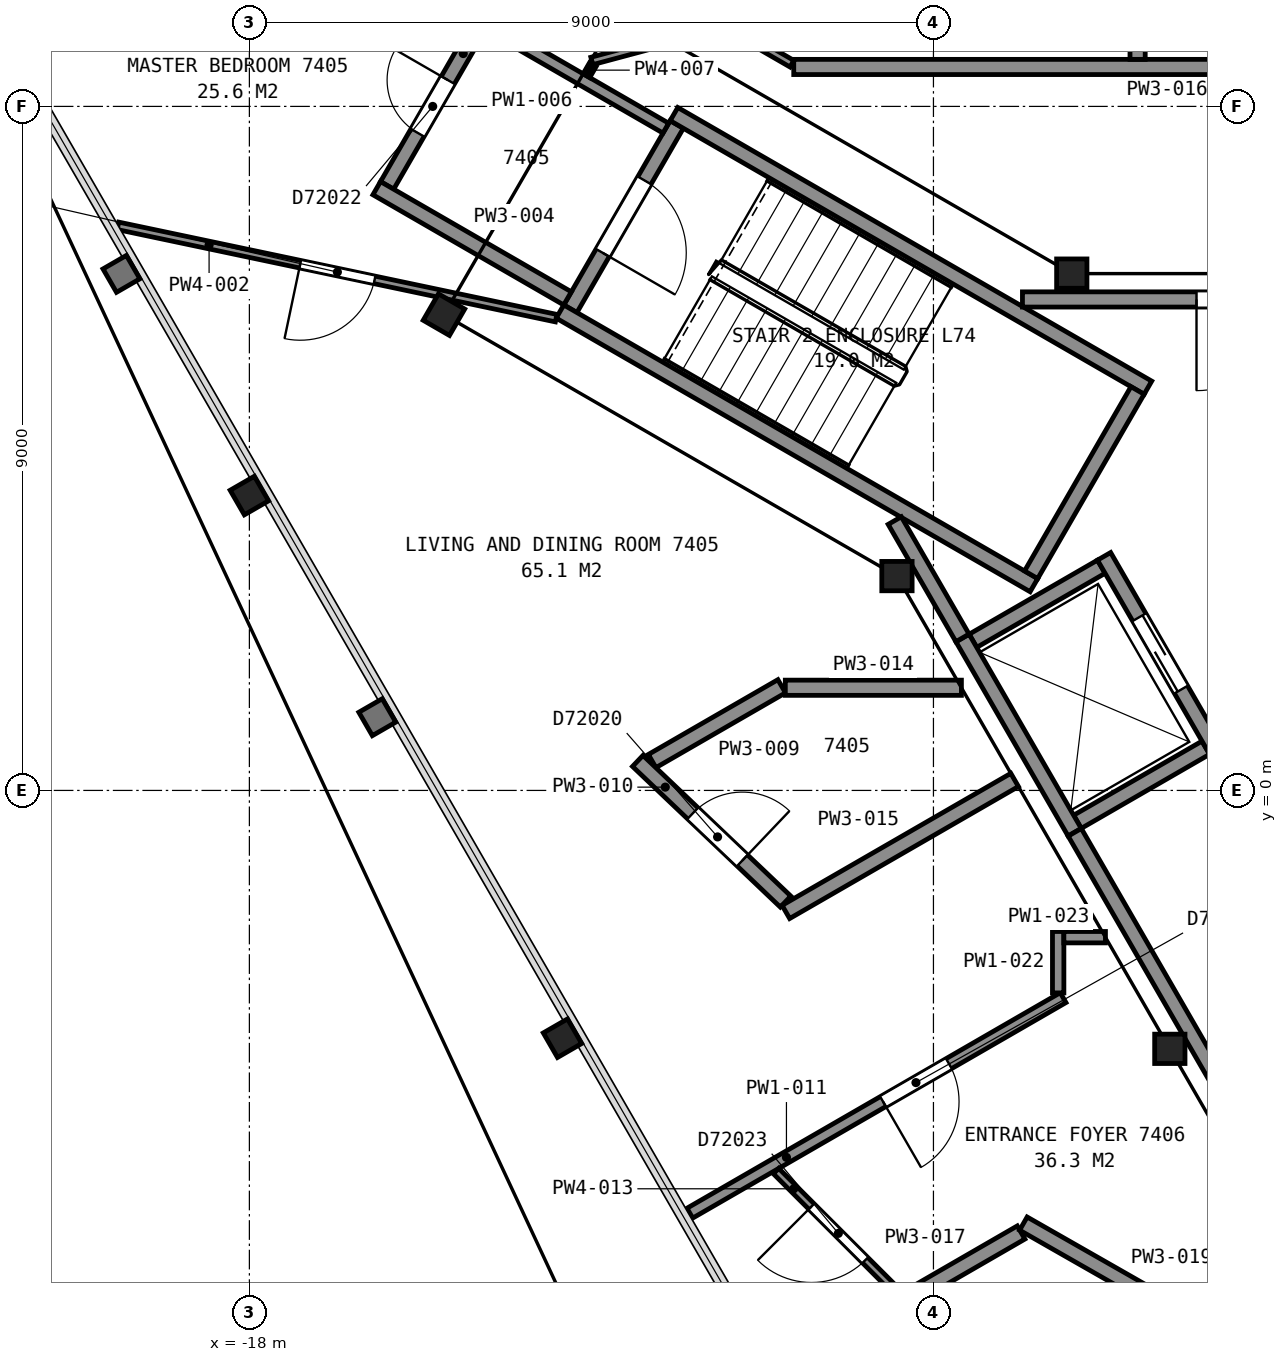
"""IFC4 building model, lengths in metres.
Left out: names, types, materials, properties, quantities, classifications, styles, units other than length and angle.
Written with IfcOpenShell. Run it as: python <this file> out.ifc"""

import sys

from ifc_helpers import new_model, si_unit, direction, frame, frame_2d, origin, origin_2d, place, context, subcontext, project, spatial, rectangle, i_section, extrude, element, fill, save


model = new_model("IFC4")
c1 = context("Model", 3, precision=1e-05, world=origin(), true_north=direction((0.0, 1.0)))
c2 = subcontext(c1, "Body", "Model", "MODEL_VIEW")
j1 = project(units=[si_unit("LENGTHUNIT", "METRE"), si_unit("PLANEANGLEUNIT", "RADIAN")], contexts=[c1])
p1 = place(None, origin())
s1 = spatial("IfcSite", under=j1, at=p1, CompositionType="ELEMENT")
p2 = place(p1, origin())
s2 = spatial("IfcBuilding", under=s1, at=p2, CompositionType="ELEMENT")
p3 = place(p2, frame((0.0, 0.0, 293.6)))
s3 = spatial("IfcBuildingStorey", under=s2, at=p3, CompositionType="ELEMENT", Elevation=293.6)
for number, where, z_axis, x_axis in (
    (1, (-18.0, 3.88, 0.0), (0.0, 0.0, 1.0), (-0.5, 0.866, 0.0)),
    (2, (-13.88, -3.26, 0.0), (0.0, 0.0, 1.0), (-0.5, 0.866, 0.0)),
):
    element("IfcColumn", number, at=place(p3, frame(where, z_axis=z_axis, x_axis=x_axis)), inside=s3, PredefinedType="COLUMN", context=c2, shape_type="SweptSolid", body=[
        extrude(i_section(OverallWidth=0.373, OverallDepth=0.368, WebThickness=0.015, FlangeThickness=0.024, FilletRadius=0.015, at=origin_2d()), origin(), (0.0, 0.0, 1.0), 3.7),
    ])
p4 = place(p3, frame((-7.18, 6.8, 0.0), z_axis=(0.0, 0.0, 1.0), x_axis=(1.0, 0.0, 0.0)))
e3 = element("IfcColumn", 3, at=p4, inside=s3, PredefinedType="COLUMN", context=c2, shape_type="SweptSolid", body=[
    extrude(i_section(OverallWidth=0.399, OverallDepth=0.386, WebThickness=0.021, FlangeThickness=0.033, FilletRadius=0.015, at=origin_2d()), origin(), (0.0, 0.0, 1.0), 3.7),
])
p5 = place(p3, frame((-15.44, 6.26, 0.0), z_axis=(0.0, 0.0, 1.0), x_axis=(0.5, 0.866025403784, 0.0)))
e4 = element("IfcColumn", 4, at=p5, inside=s3, PredefinedType="COLUMN", context=c2, shape_type="SweptSolid", body=[
    extrude(i_section(OverallWidth=0.401, OverallDepth=0.399, WebThickness=0.025, FlangeThickness=0.04, FilletRadius=0.015, at=origin_2d()), origin(), (0.0, 0.0, 1.0), 3.7),
])
for number, where, z_axis, x_axis in (
    (5, (-9.48, 2.82, 0.0), (0.0, 0.0, 1.0), (1.0, 0.0, 0.0)),
    (6, (-5.89, -3.4, 0.0), (0.0, 0.0, 1.0), (1.0, 0.0, 0.0)),
):
    element("IfcColumn", number, at=place(p3, frame(where, z_axis=z_axis, x_axis=x_axis)), inside=s3, PredefinedType="COLUMN", context=c2, shape_type="SweptSolid", body=[
        extrude(i_section(OverallWidth=0.399, OverallDepth=0.386, WebThickness=0.021, FlangeThickness=0.033, FilletRadius=0.015, at=origin_2d()), origin(), (0.0, 0.0, 1.0), 3.7),
    ])
p6 = place(p3, frame((-12.377, 8.762, 0.0), z_axis=(0.0, 0.0, 1.0), x_axis=(-0.500049511043, -0.865996816683, 0.0)))
e7 = element("IfcWall", 7, at=p6, inside=s3, PredefinedType="PARTITIONING", context=c2, shape_type="SweptSolid", body=[
    extrude(rectangle(XDim=2.8, YDim=0.2, at=frame_2d((1.4, 0.0))), origin(), (0.0, 0.0, 1.0), 3.45),
])
p7 = place(p6, frame((0.85, 0.0, 0.0)))
e8 = element("IfcOpeningElement", 8, at=p7, cuts=e7, PredefinedType="OPENING", context=c2, shape_type="SweptSolid", body=[
    extrude(rectangle(XDim=1.1, YDim=2.1, at=frame_2d((0.55, 1.05))), frame((0.0, 0.11, 0.0), z_axis=(0.0, -1.0, 0.0), x_axis=(1.0, 0.0, 0.0)), (0.0, 0.0, 1.0), 0.22),
])
for number, where, z_axis, x_axis in (
    (9, (-7.678, 2.701, 0.0), (0.0, 0.0, 1.0), (-0.866, 0.5, 0.0)),
    (10, (-6.178, 5.299, 0.0), (0.0, 0.0, 1.0), (-0.866, 0.5, 0.0)),
):
    element("IfcWall", number, at=place(p3, frame(where, z_axis=z_axis, x_axis=x_axis)), inside=s3, PredefinedType="PARTITIONING", context=c2, shape_type="SweptSolid", body=[
        extrude(rectangle(XDim=7.2, YDim=0.2, at=frame_2d((3.6, 0.0))), origin(), (0.0, 0.0, 1.0), 3.45),
    ])
p8 = place(p3, frame((-6.315, 5.262, 0.0), z_axis=(0.0, 0.0, 1.0), x_axis=(-0.500049511043, -0.865996816683, 0.0)))
e11 = element("IfcWall", 11, at=p8, inside=s3, PredefinedType="PARTITIONING", context=c2, shape_type="SweptSolid", body=[
    extrude(rectangle(XDim=2.8, YDim=0.2, at=frame_2d((1.4, 0.0))), origin(), (0.0, 0.0, 1.0), 3.45),
])
for number, where, z_axis, x_axis in (
    (12, (-7.105, -0.413, 0.0), (0.0, 0.0, 1.0), (0.866, 0.5, 0.0)),
    (13, (-8.48, 1.969, 0.0), (0.0, 0.0, 1.0), (0.866, 0.5, 0.0)),
):
    element("IfcWall", number, at=place(p3, frame(where, z_axis=z_axis, x_axis=x_axis)), inside=s3, PredefinedType="PARTITIONING", context=c2, shape_type="SweptSolid", body=[
        extrude(rectangle(XDim=1.95, YDim=0.2, at=frame_2d((0.975, 0.0))), origin(), (0.0, 0.0, 1.0), 3.7),
    ])
p9 = place(p3, frame((-5.28, 0.525, 0.0), z_axis=(0.0, 0.0, 1.0), x_axis=(-0.500037662692, 0.866003658127, 0.0)))
e14 = element("IfcWall", 14, at=p9, inside=s3, PredefinedType="PARTITIONING", context=c2, shape_type="SweptSolid", body=[
    extrude(rectangle(XDim=2.95, YDim=0.2, at=frame_2d((1.475, 0.0))), origin(), (0.0, 0.0, 1.0), 3.7),
])
p10 = place(p9, frame((0.925, 0.0, 0.0)))
e15 = element("IfcOpeningElement", 15, at=p10, cuts=e14, PredefinedType="OPENING", context=c2, shape_type="SweptSolid", body=[
    extrude(rectangle(XDim=1.1, YDim=2.1, at=frame_2d((0.55, 1.05))), frame((0.0, 0.11, 0.0), z_axis=(0.0, -1.0, 0.0), x_axis=(1.0, 0.0, 0.0)), (0.0, 0.0, 1.0), 0.22),
])
p11 = place(p3, frame((-7.142, -0.55, 0.0), z_axis=(0.0, 0.0, 1.0), x_axis=(-0.49997559174, 0.866039495442, 0.0)))
e16 = element("IfcWall", 16, at=p11, inside=s3, PredefinedType="PARTITIONING", context=c2, shape_type="SweptSolid", body=[
    extrude(rectangle(XDim=2.95, YDim=0.2, at=frame_2d((1.475, 0.0))), origin(), (0.0, 0.0, 1.0), 3.7),
])
p12 = place(p3, frame((-9.509, 3.551, 0.0), z_axis=(0.0, 0.0, 1.0), x_axis=(0.499999136801, -0.866025902152, 0.0)))
e17 = element("IfcWall", 17, at=p12, inside=s3, PredefinedType="PARTITIONING", context=c2, shape_type="SweptSolid", body=[
    extrude(rectangle(XDim=1.782, YDim=0.2, at=frame_2d((0.891, 0.0))), origin(), (0.0, 0.0, 1.0), 3.45),
])
p13 = place(p3, frame((7.829, 6.46, 0.0), z_axis=(0.0, 0.0, 1.0), x_axis=(-1.0, 0.0, 0.0)))
e18 = element("IfcWall", 18, at=p13, inside=s3, PredefinedType="PARTITIONING", context=c2, shape_type="SweptSolid", body=[
    extrude(rectangle(XDim=15.658, YDim=0.2, at=frame_2d((7.829, 0.0))), origin(), (0.0, 0.0, 1.0), 3.45),
])
p14 = place(p13, frame((12.168, 0.0, 0.0)))
e19 = element("IfcOpeningElement", 19, at=p14, cuts=e18, PredefinedType="OPENING", context=c2, shape_type="SweptSolid", body=[
    extrude(rectangle(XDim=1.2, YDim=2.1, at=frame_2d((0.6, 1.05))), frame((0.0, 0.11, 0.0), z_axis=(0.0, -1.0, 0.0), x_axis=(1.0, 0.0, 0.0)), (0.0, 0.0, 1.0), 0.22),
])
p15 = place(p3, frame((-7.141, -0.551, 0.0), z_axis=(0.0, 0.0, 1.0), x_axis=(0.500001302854, -0.86602465158, 0.0)))
e20 = element("IfcWall", 20, at=p15, inside=s3, PredefinedType="PARTITIONING", context=c2, shape_type="SweptSolid", body=[
    extrude(rectangle(XDim=6.846, YDim=0.2, at=frame_2d((3.423, 0.0))), origin(), (0.0, 0.0, 1.0), 3.45),
])
p16 = place(p15, frame((5.0, 0.0, 0.0)))
e21 = element("IfcOpeningElement", 21, at=p16, cuts=e20, PredefinedType="OPENING", context=c2, shape_type="SweptSolid", body=[
    extrude(rectangle(XDim=1.2, YDim=2.1, at=frame_2d((0.6, 1.05))), frame((0.0, 0.11, 0.0), z_axis=(0.0, -1.0, 0.0), x_axis=(1.0, 0.0, 0.0)), (0.0, 0.0, 1.0), 0.22),
])
p17 = place(p3, frame((-19.729, 7.428, 0.0), z_axis=(0.0, 0.0, 1.0), x_axis=(0.97852427483, -0.206131617102, 0.0)))
e22 = element("IfcWall", 22, at=p17, inside=s3, PredefinedType="PARTITIONING", context=c2, shape_type="SweptSolid", body=[
    extrude(rectangle(XDim=5.891, YDim=0.1, at=frame_2d((2.946, 0.0))), origin(), (0.0, 0.0, 1.0), 2.723),
])
p18 = place(p17, frame((2.45, 0.0, 0.0)))
e23 = element("IfcOpeningElement", 23, at=p18, cuts=e22, PredefinedType="OPENING", context=c2, shape_type="SweptSolid", body=[
    extrude(rectangle(XDim=1.0, YDim=2.1, at=frame_2d((0.5, 1.05))), frame((0.0, 0.06, 0.0), z_axis=(0.0, -1.0, 0.0), x_axis=(1.0, 0.0, 0.0)), (0.0, 0.0, 1.0), 0.12),
])
p19 = place(p3, frame((-14.985, 10.045, 0.0), z_axis=(0.0, 0.0, 1.0), x_axis=(-0.499903970786, -0.866080839178, 0.0)))
e24 = element("IfcWall", 24, at=p19, inside=s3, PredefinedType="PARTITIONING", context=c2, shape_type="SweptSolid", body=[
    extrude(rectangle(XDim=2.406, YDim=0.2, at=frame_2d((1.203, 0.0))), origin(), (0.0, 0.0, 1.0), 2.723),
])
p20 = place(p19, frame((0.806, 0.0, 0.0)))
e25 = element("IfcOpeningElement", 25, at=p20, cuts=e24, PredefinedType="OPENING", context=c2, shape_type="SweptSolid", body=[
    extrude(rectangle(XDim=0.8, YDim=2.1, at=frame_2d((0.4, 1.05))), frame((0.0, 0.11, 0.0), z_axis=(0.0, -1.0, 0.0), x_axis=(1.0, 0.0, 0.0)), (0.0, 0.0, 1.0), 0.22),
])
p21 = place(p3, frame((-16.325, 7.924, 0.0), z_axis=(0.0, 0.0, 1.0), x_axis=(0.865969617579, -0.500096612097, 0.0)))
e26 = element("IfcWall", 26, at=p21, inside=s3, PredefinedType="PARTITIONING", context=c2, shape_type="SweptSolid", body=[
    extrude(rectangle(XDim=2.899, YDim=0.2, at=frame_2d((1.45, 0.0))), origin(), (0.0, 0.0, 1.0), 2.723),
])
p22 = place(p3, frame((-14.945, 10.114, 0.0), z_axis=(0.0, 0.0, 1.0), x_axis=(0.865969158485, -0.500097407065, 0.0)))
e27 = element("IfcWall", 27, at=p22, inside=s3, PredefinedType="PARTITIONING", context=c2, shape_type="SweptSolid", body=[
    extrude(rectangle(XDim=2.799, YDim=0.15, at=frame_2d((1.4, 0.0))), origin(), (0.0, 0.0, 1.0), 2.723),
])
p23 = place(p3, frame((-13.565, 9.404, 0.0), z_axis=(0.0, 0.0, 1.0), x_axis=(0.500181256421, 0.865920730047, 0.0)))
e28 = element("IfcWall", 28, at=p23, inside=s3, PredefinedType="PARTITIONING", context=c2, shape_type="SweptSolid", body=[
    extrude(rectangle(XDim=0.169, YDim=0.1, at=frame_2d((0.084, 0.0))), origin(), (0.0, 0.0, 1.0), 2.723),
])
p24 = place(p3, frame((-13.494, 9.598, 0.0), z_axis=(0.0, 0.0, 1.0), x_axis=(0.96601104623, 0.258500790254, 0.0)))
e29 = element("IfcWall", 29, at=p24, inside=s3, PredefinedType="PARTITIONING", context=c2, shape_type="SweptSolid", body=[
    extrude(rectangle(XDim=1.867, YDim=0.1, at=frame_2d((0.934, 0.0))), origin(), (0.0, 0.0, 1.0), 2.723),
])
p25 = place(p3, frame((-12.701, 0.386, 0.0), z_axis=(0.0, 0.0, 1.0), x_axis=(0.866028603765, 0.49999445743, 0.0)))
e30 = element("IfcWall", 30, at=p25, inside=s3, PredefinedType="PARTITIONING", context=c2, shape_type="SweptSolid", body=[
    extrude(rectangle(XDim=1.968, YDim=0.2, at=frame_2d((0.984, 0.0))), origin(), (0.0, 0.0, 1.0), 2.723),
])
p26 = place(p3, frame((-12.89, 0.388, 0.0), z_axis=(0.0, 0.0, 1.0), x_axis=(0.724395225918, -0.689384911836, 0.0)))
e31 = element("IfcWall", 31, at=p26, inside=s3, PredefinedType="PARTITIONING", context=c2, shape_type="SweptSolid", body=[
    extrude(rectangle(XDim=2.685, YDim=0.2, at=frame_2d((1.342, 0.0))), origin(), (0.0, 0.0, 1.0), 2.723),
])
p27 = place(p26, frame((1.0, 0.0, 0.0)))
e32 = element("IfcOpeningElement", 32, at=p27, cuts=e31, PredefinedType="OPENING", context=c2, shape_type="SweptSolid", body=[
    extrude(rectangle(XDim=0.9, YDim=2.1, at=frame_2d((0.45, 1.05))), frame((0.0, 0.11, 0.0), z_axis=(0.0, -1.0, 0.0), x_axis=(1.0, 0.0, 0.0)), (0.0, 0.0, 1.0), 0.22),
])
p28 = place(p3, frame((-12.205, -5.562, 0.0), z_axis=(0.0, 0.0, 1.0), x_axis=(0.866006351856, 0.500032997455, 0.0)))
e33 = element("IfcWall", 33, at=p28, inside=s3, PredefinedType="PARTITIONING", context=c2, shape_type="SweptSolid", body=[
    extrude(rectangle(XDim=5.671, YDim=0.15, at=frame_2d((2.835, 0.0))), origin(), (0.0, 0.0, 1.0), 2.723),
])
p29 = place(p28, frame((2.935, 0.0, 0.0)))
e34 = element("IfcOpeningElement", 34, at=p29, cuts=e33, PredefinedType="OPENING", context=c2, shape_type="SweptSolid", body=[
    extrude(rectangle(XDim=1.0, YDim=2.1, at=frame_2d((0.5, 1.05))), frame((0.0, 0.085, 0.0), z_axis=(0.0, -1.0, 0.0), x_axis=(1.0, 0.0, 0.0)), (0.0, 0.0, 1.0), 0.17),
])
p30 = place(p3, frame((-11.678, 10.033, 0.0), z_axis=(0.0, 0.0, 1.0), x_axis=(0.866116627388, -0.499841962787, 0.0)))
e35 = element("IfcWall", 35, at=p30, inside=s3, PredefinedType="PARTITIONING", context=c2, shape_type="SweptSolid", body=[
    extrude(rectangle(XDim=0.943, YDim=0.1, at=frame_2d((0.472, 0.0))), origin(), (0.0, 0.0, 1.0), 2.723),
])
p31 = place(p3, frame((-9.452, -6.627, 0.0), z_axis=(0.0, 0.0, 1.0), x_axis=(-0.707106781187, 0.707106781187, 0.0)))
e36 = element("IfcWall", 36, at=p31, inside=s3, PredefinedType="PARTITIONING", context=c2, shape_type="SweptSolid", body=[
    extrude(rectangle(XDim=2.289, YDim=0.1, at=frame_2d((1.145, 0.0))), origin(), (0.0, 0.0, 1.0), 2.723),
])
p32 = place(p31, frame((0.63, 0.0, 0.0)))
e37 = element("IfcOpeningElement", 37, at=p32, cuts=e36, PredefinedType="OPENING", context=c2, shape_type="SweptSolid", body=[
    extrude(rectangle(XDim=1.0, YDim=2.1, at=frame_2d((0.5, 1.05))), frame((0.0, 0.06, 0.0), z_axis=(0.0, -1.0, 0.0), x_axis=(1.0, 0.0, 0.0)), (0.0, 0.0, 1.0), 0.12),
])
p33 = place(p3, frame((-10.949, 1.351, 0.0), z_axis=(0.0, 0.0, 1.0), x_axis=(1.0, 0.0, 0.0)))
e38 = element("IfcWall", 38, at=p33, inside=s3, PredefinedType="PARTITIONING", context=c2, shape_type="SweptSolid", body=[
    extrude(rectangle(XDim=2.317, YDim=0.2, at=frame_2d((1.158, 0.0))), origin(), (0.0, 0.0, 1.0), 2.723),
])
p34 = place(p3, frame((-10.942, -1.599, 0.0), z_axis=(0.0, 0.0, 1.0), x_axis=(0.866134116492, 0.499811656775, 0.0)))
e39 = element("IfcWall", 39, at=p34, inside=s3, PredefinedType="PARTITIONING", context=c2, shape_type="SweptSolid", body=[
    extrude(rectangle(XDim=3.475, YDim=0.2, at=frame_2d((1.737, 0.0))), origin(), (0.0, 0.0, 1.0), 2.723),
])
p35 = place(p3, frame((-10.838, 9.519, 0.0), z_axis=(0.0, 0.0, 1.0), x_axis=(1.0, 0.0, 0.0)))
e40 = element("IfcWall", 40, at=p35, inside=s3, PredefinedType="PARTITIONING", context=c2, shape_type="SweptSolid", body=[
    extrude(rectangle(XDim=9.824, YDim=0.2, at=frame_2d((4.912, 0.0))), origin(), (0.0, 0.0, 1.0), 2.723),
])
p36 = place(p3, frame((-9.27, -6.638, 0.0), z_axis=(0.0, 0.0, 1.0), x_axis=(0.865883664904, 0.500245418622, 0.0)))
e41 = element("IfcWall", 41, at=p36, inside=s3, PredefinedType="PARTITIONING", context=c2, shape_type="SweptSolid", body=[
    extrude(rectangle(XDim=1.643, YDim=0.2, at=frame_2d((0.822, 0.0))), origin(), (0.0, 0.0, 1.0), 2.723),
])
p37 = place(p3, frame((-7.817, -5.699, 0.0), z_axis=(0.0, 0.0, 1.0), x_axis=(0.868528315933, -0.495639550906, 0.0)))
e42 = element("IfcWall", 42, at=p37, inside=s3, PredefinedType="PARTITIONING", context=c2, shape_type="SweptSolid", body=[
    extrude(rectangle(XDim=3.212, YDim=0.2, at=frame_2d((1.606, 0.0))), origin(), (0.0, 0.0, 1.0), 2.723),
])
p38 = place(p3, frame((-7.359, -2.664, 0.0), z_axis=(0.0, 0.0, 1.0), x_axis=(0.0, 1.0, 0.0)))
e43 = element("IfcWall", 43, at=p38, inside=s3, PredefinedType="PARTITIONING", context=c2, shape_type="SweptSolid", body=[
    extrude(rectangle(XDim=0.808, YDim=0.15, at=frame_2d((0.404, 0.0))), origin(), (0.0, 0.0, 1.0), 2.723),
])
p39 = place(p3, frame((-7.284, -1.931, 0.0), z_axis=(0.0, 0.0, 1.0), x_axis=(1.0, 0.0, 0.0)))
e44 = element("IfcWall", 44, at=p39, inside=s3, PredefinedType="PARTITIONING", context=c2, shape_type="SweptSolid", body=[
    extrude(rectangle(XDim=0.547, YDim=0.15, at=frame_2d((0.273, 0.0))), origin(), (0.0, 0.0, 1.0), 2.723),
])
p40 = place(p3, frame((-6.314, 11.919, 0.0), z_axis=(0.0, 0.0, 1.0), x_axis=(0.0, -1.0, 0.0)))
e45 = element("IfcWall", 45, at=p40, inside=s3, PredefinedType="PARTITIONING", context=c2, shape_type="SweptSolid", body=[
    extrude(rectangle(XDim=2.3, YDim=0.2, at=frame_2d((1.15, 0.0))), origin(), (0.0, 0.0, 1.0), 2.723),
])
p41 = place(p40, frame((0.75, 0.0, 0.0)))
e46 = element("IfcOpeningElement", 46, at=p41, cuts=e45, PredefinedType="OPENING", context=c2, shape_type="SweptSolid", body=[
    extrude(rectangle(XDim=0.8, YDim=2.1, at=frame_2d((0.4, 1.05))), frame((0.0, 0.11, 0.0), z_axis=(0.0, -1.0, 0.0), x_axis=(1.0, 0.0, 0.0)), (0.0, 0.0, 1.0), 0.22),
])
p42 = place(p7, origin())
e47 = element("IfcDoor", 47, at=p42, inside=s3, OperationType="SINGLE_SWING_RIGHT", PredefinedType="DOOR", context=c2, shape_type="SweptSolid", body=[
    extrude(rectangle(XDim=1.1, YDim=2.1, at=frame_2d((0.55, 1.05))), frame((0.0, 0.025, 0.0), z_axis=(0.0, -1.0, 0.0), x_axis=(1.0, 0.0, 0.0)), (0.0, 0.0, 1.0), 0.05),
])
fill(e8, e47)
p43 = place(p10, origin())
e48 = element("IfcDoor", 48, at=p43, inside=s3, OperationType="SLIDING_TO_LEFT", PredefinedType="DOOR", context=c2, shape_type="SweptSolid", body=[
    extrude(rectangle(XDim=1.1, YDim=2.1, at=frame_2d((0.55, 1.05))), frame((0.0, 0.025, 0.0), z_axis=(0.0, -1.0, 0.0), x_axis=(1.0, 0.0, 0.0)), (0.0, 0.0, 1.0), 0.05),
])
fill(e15, e48)
p44 = place(p14, origin())
e49 = element("IfcDoor", 49, at=p44, inside=s3, OperationType="SINGLE_SWING_RIGHT", PredefinedType="DOOR", context=c2, shape_type="SweptSolid", body=[
    extrude(rectangle(XDim=1.2, YDim=2.1, at=frame_2d((0.6, 1.05))), frame((0.0, 0.025, 0.0), z_axis=(0.0, -1.0, 0.0), x_axis=(1.0, 0.0, 0.0)), (0.0, 0.0, 1.0), 0.05),
])
fill(e19, e49)
p45 = place(p18, origin())
e50 = element("IfcDoor", 50, at=p45, inside=s3, OperationType="SINGLE_SWING_LEFT", PredefinedType="DOOR", context=c2, shape_type="SweptSolid", body=[
    extrude(rectangle(XDim=1.0, YDim=2.1, at=frame_2d((0.5, 1.05))), frame((0.0, 0.025, 0.0), z_axis=(0.0, -1.0, 0.0), x_axis=(1.0, 0.0, 0.0)), (0.0, 0.0, 1.0), 0.05),
])
fill(e23, e50)
p46 = place(p20, origin())
e51 = element("IfcDoor", 51, at=p46, inside=s3, OperationType="SINGLE_SWING_LEFT", PredefinedType="DOOR", context=c2, shape_type="SweptSolid", body=[
    extrude(rectangle(XDim=0.8, YDim=2.1, at=frame_2d((0.4, 1.05))), frame((0.0, 0.025, 0.0), z_axis=(0.0, -1.0, 0.0), x_axis=(1.0, 0.0, 0.0)), (0.0, 0.0, 1.0), 0.05),
])
fill(e25, e51)
p47 = place(p27, origin())
e52 = element("IfcDoor", 52, at=p47, inside=s3, OperationType="SINGLE_SWING_RIGHT", PredefinedType="DOOR", context=c2, shape_type="SweptSolid", body=[
    extrude(rectangle(XDim=0.9, YDim=2.1, at=frame_2d((0.45, 1.05))), frame((0.0, 0.025, 0.0), z_axis=(0.0, -1.0, 0.0), x_axis=(1.0, 0.0, 0.0)), (0.0, 0.0, 1.0), 0.05),
])
fill(e32, e52)
p48 = place(p29, origin())
e53 = element("IfcDoor", 53, at=p48, inside=s3, OperationType="SINGLE_SWING_LEFT", PredefinedType="DOOR", context=c2, shape_type="SweptSolid", body=[
    extrude(rectangle(XDim=1.0, YDim=2.1, at=frame_2d((0.5, 1.05))), frame((0.0, 0.025, 0.0), z_axis=(0.0, -1.0, 0.0), x_axis=(1.0, 0.0, 0.0)), (0.0, 0.0, 1.0), 0.05),
])
fill(e34, e53)
p49 = place(p32, origin())
e54 = element("IfcDoor", 54, at=p49, inside=s3, OperationType="SINGLE_SWING_RIGHT", PredefinedType="DOOR", context=c2, shape_type="SweptSolid", body=[
    extrude(rectangle(XDim=1.0, YDim=2.1, at=frame_2d((0.5, 1.05))), frame((0.0, 0.025, 0.0), z_axis=(0.0, -1.0, 0.0), x_axis=(1.0, 0.0, 0.0)), (0.0, 0.0, 1.0), 0.05),
])
fill(e37, e54)
save(model, sys.argv[1])
